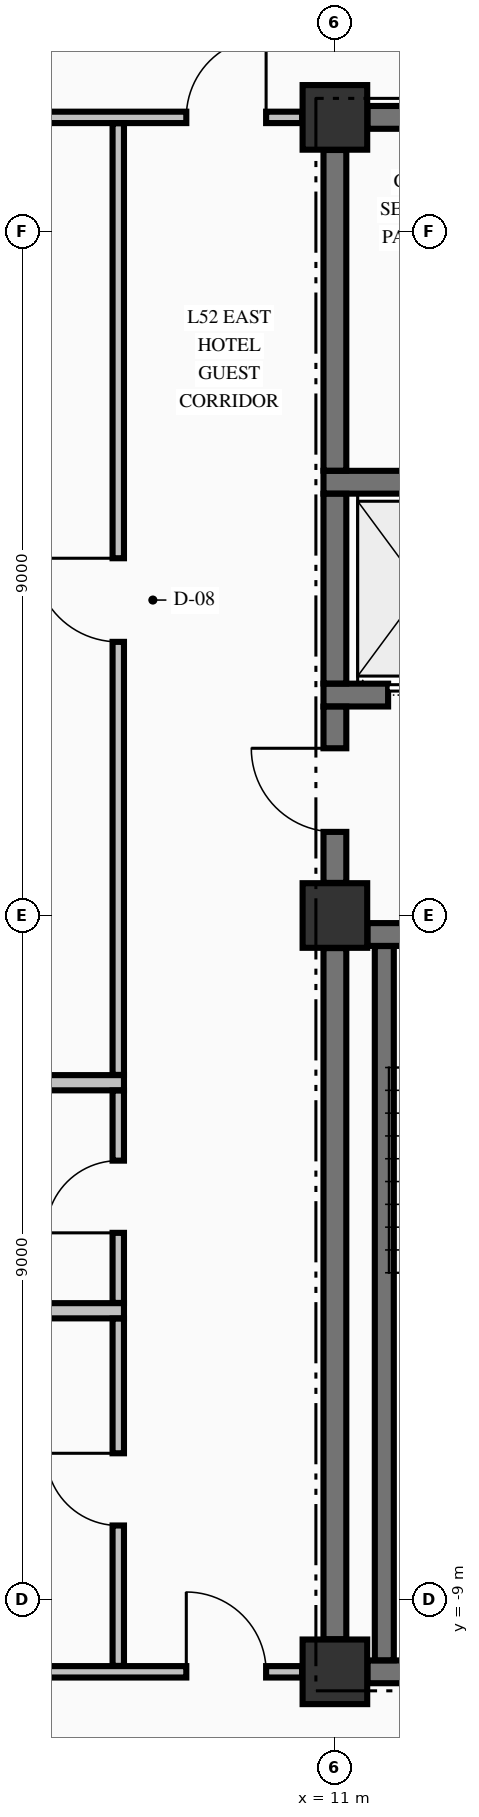
"""IFC4 building model, lengths in metres.
Left out: names, types, materials, properties, quantities, classifications, styles, units other than length and angle.
Written with IfcOpenShell. Run it as: python <this file> out.ifc"""

import sys

from ifc_helpers import new_model, si_unit, direction, frame, frame_2d, origin, origin_2d, place, context, subcontext, project, spatial, rectangle, extrude, element, fill, save


model = new_model("IFC4")
c1 = context("Model", 3, precision=1e-05, world=origin(), true_north=direction((0.0, 1.0)))
c2 = subcontext(c1, "Body", "Model", "MODEL_VIEW")
j1 = project(units=[si_unit("LENGTHUNIT", "METRE"), si_unit("PLANEANGLEUNIT", "RADIAN")], contexts=[c1])
p1 = place(None, origin())
s1 = spatial("IfcSite", under=j1, at=p1, CompositionType="ELEMENT")
p2 = place(p1, origin())
s2 = spatial("IfcBuilding", under=s1, at=p2, CompositionType="ELEMENT")
p3 = place(p2, frame((0.0, 0.0, 201.66)))
s3 = spatial("IfcBuildingStorey", under=s2, at=p3, CompositionType="ELEMENT", Elevation=201.66)
for number, where, z_axis, x_axis in (
    (1, (11.0, -9.95, -0.25), (0.0, 0.0, 1.0), (1.0, 0.0, 0.0)),
    (2, (11.0, 0.0, -0.25), (0.0, 0.0, 1.0), (1.0, 0.0, 0.0)),
    (3, (11.0, 10.5, -0.25), (0.0, 0.0, 1.0), (1.0, 0.0, 0.0)),
):
    element("IfcColumn", number, at=place(p3, frame(where, z_axis=z_axis, x_axis=x_axis)), inside=s3, PredefinedType="COLUMN", context=c2, shape_type="SweptSolid", body=[
        extrude(rectangle(XDim=0.85, YDim=0.85, at=origin_2d()), origin(), (0.0, 0.0, 1.0), 3.4),
    ])
p4 = place(p3, frame((11.429, -9.95, 0.0), z_axis=(0.0, 0.0, 1.0), x_axis=(1.0, 0.0, 0.0)))
e4 = element("IfcWall", 4, at=p4, inside=s3, PredefinedType="SHEAR", context=c2, shape_type="SweptSolid", body=[
    extrude(rectangle(XDim=3.271, YDim=0.3, at=frame_2d((1.635, 0.0))), origin(), (0.0, 0.0, 1.0), 3.15),
])
p5 = place(p3, frame((11.429, -0.25, 0.0), z_axis=(0.0, 0.0, 1.0), x_axis=(1.0, 0.0, 0.0)))
e5 = element("IfcWall", 5, at=p5, inside=s3, PredefinedType="SHEAR", context=c2, shape_type="SweptSolid", body=[
    extrude(rectangle(XDim=3.446, YDim=0.3, at=frame_2d((1.723, 0.0))), origin(), (0.0, 0.0, 1.0), 3.15),
])
p6 = place(p5, frame((1.171, 0.0, 0.0)))
e6 = element("IfcOpeningElement", 6, at=p6, cuts=e5, PredefinedType="OPENING", context=c2, shape_type="SweptSolid", body=[
    extrude(rectangle(XDim=1.1, YDim=2.15, at=frame_2d((0.55, 1.075))), frame((0.0, 0.16, 0.0), z_axis=(0.0, -1.0, 0.0), x_axis=(1.0, 0.0, 0.0)), (0.0, 0.0, 1.0), 0.32),
])
p7 = place(p3, frame((10.85, 2.9, 0.0), z_axis=(0.0, 0.0, 1.0), x_axis=(1.0, 0.0, 0.0)))
e7 = element("IfcWall", 7, at=p7, inside=s3, PredefinedType="SHEAR", context=c2, shape_type="SweptSolid", body=[
    extrude(rectangle(XDim=4.025, YDim=0.3, at=frame_2d((2.012, 0.0))), origin(), (0.0, 0.0, 1.0), 3.15),
])
p8 = place(p7, frame((0.85, 0.0, 0.0)))
e8 = element("IfcOpeningElement", 8, at=p8, cuts=e7, PredefinedType="OPENING", context=c2, shape_type="SweptSolid", body=[
    extrude(rectangle(XDim=1.1, YDim=2.2, at=frame_2d((0.55, 1.1))), frame((0.0, 0.16, 0.0), z_axis=(0.0, -1.0, 0.0), x_axis=(1.0, 0.0, 0.0)), (0.0, 0.0, 1.0), 0.32),
])
p9 = place(p3, frame((10.85, 5.7, 0.0), z_axis=(0.0, 0.0, 1.0), x_axis=(1.0, 0.0, 0.0)))
e9 = element("IfcWall", 9, at=p9, inside=s3, PredefinedType="SHEAR", context=c2, shape_type="SweptSolid", body=[
    extrude(rectangle(XDim=4.025, YDim=0.3, at=frame_2d((2.012, 0.0))), origin(), (0.0, 0.0, 1.0), 3.15),
])
p10 = place(p3, frame((11.429, 10.5, 0.0), z_axis=(0.0, 0.0, 1.0), x_axis=(1.0, 0.0, 0.0)))
e10 = element("IfcWall", 10, at=p10, inside=s3, PredefinedType="SHEAR", context=c2, shape_type="SweptSolid", body=[
    extrude(rectangle(XDim=3.271, YDim=0.3, at=frame_2d((1.635, 0.0))), origin(), (0.0, 0.0, 1.0), 3.15),
])
p11 = place(p10, frame((2.076, 0.0, 0.0)))
e11 = element("IfcOpeningElement", 11, at=p11, cuts=e10, PredefinedType="OPENING", context=c2, shape_type="SweptSolid", body=[
    extrude(rectangle(XDim=0.95, YDim=2.15, at=frame_2d((0.475, 1.075))), frame((0.0, 0.16, 0.0), z_axis=(0.0, -1.0, 0.0), x_axis=(1.0, 0.0, 0.0)), (0.0, 0.0, 1.0), 0.32),
])
p12 = place(p3, frame((-10.569, -9.95, 0.0), z_axis=(0.0, 0.0, 1.0), x_axis=(1.0, 0.0, 0.0)))
e12 = element("IfcWall", 12, at=p12, inside=s3, PredefinedType="PARTITIONING", context=c2, shape_type="SweptSolid", body=[
    extrude(rectangle(XDim=21.138, YDim=0.15, at=frame_2d((10.569, 0.0))), origin(), (0.0, 0.0, 1.0), 3.15),
])
p13 = place(p12, frame((0.474, 0.0, 0.0)))
e13 = element("IfcOpeningElement", 13, at=p13, cuts=e12, PredefinedType="OPENING", context=c2, shape_type="SweptSolid", body=[
    extrude(rectangle(XDim=1.05, YDim=2.15, at=frame_2d((0.525, 1.075))), frame((0.0, 0.085, 0.0), z_axis=(0.0, -1.0, 0.0), x_axis=(1.0, 0.0, 0.0)), (0.0, 0.0, 1.0), 0.17),
])
p14 = place(p12, frame((19.614, 0.0, 0.0)))
e14 = element("IfcOpeningElement", 14, at=p14, cuts=e12, PredefinedType="OPENING", context=c2, shape_type="SweptSolid", body=[
    extrude(rectangle(XDim=1.05, YDim=2.15, at=frame_2d((0.525, 1.075))), frame((0.0, 0.085, 0.0), z_axis=(0.0, -1.0, 0.0), x_axis=(1.0, 0.0, 0.0)), (0.0, 0.0, 1.0), 0.17),
])
p15 = place(p12, frame((13.574, 0.0, 0.0)))
e15 = element("IfcOpeningElement", 15, at=p15, cuts=e12, PredefinedType="OPENING", context=c2, shape_type="SweptSolid", body=[
    extrude(rectangle(XDim=0.95, YDim=2.15, at=frame_2d((0.475, 1.075))), frame((0.0, 0.085, 0.0), z_axis=(0.0, -1.0, 0.0), x_axis=(1.0, 0.0, 0.0)), (0.0, 0.0, 1.0), 0.17),
])
for number, where, z_axis, x_axis in (
    (16, (1.7, -5.2, 0.0), (0.0, 0.0, 1.0), (1.0, 0.0, 0.0)),
    (17, (1.7, -2.2, 0.0), (0.0, 0.0, 1.0), (1.0, 0.0, 0.0)),
):
    element("IfcWall", number, at=place(p3, frame(where, z_axis=z_axis, x_axis=x_axis)), inside=s3, PredefinedType="PARTITIONING", context=c2, shape_type="SweptSolid", body=[
        extrude(rectangle(XDim=6.525, YDim=0.2, at=frame_2d((3.263, 0.0))), origin(), (0.0, 0.0, 1.0), 3.15),
    ])
p16 = place(p3, frame((-10.569, 10.5, 0.0), z_axis=(0.0, 0.0, 1.0), x_axis=(1.0, 0.0, 0.0)))
e18 = element("IfcWall", 18, at=p16, inside=s3, PredefinedType="PARTITIONING", context=c2, shape_type="SweptSolid", body=[
    extrude(rectangle(XDim=21.138, YDim=0.15, at=frame_2d((10.569, 0.0))), origin(), (0.0, 0.0, 1.0), 3.15),
])
p17 = place(p16, frame((0.474, 0.0, 0.0)))
e19 = element("IfcOpeningElement", 19, at=p17, cuts=e18, PredefinedType="OPENING", context=c2, shape_type="SweptSolid", body=[
    extrude(rectangle(XDim=1.05, YDim=2.15, at=frame_2d((0.525, 1.075))), frame((0.0, 0.085, 0.0), z_axis=(0.0, -1.0, 0.0), x_axis=(1.0, 0.0, 0.0)), (0.0, 0.0, 1.0), 0.17),
])
p18 = place(p16, frame((19.614, 0.0, 0.0)))
e20 = element("IfcOpeningElement", 20, at=p18, cuts=e18, PredefinedType="OPENING", context=c2, shape_type="SweptSolid", body=[
    extrude(rectangle(XDim=1.05, YDim=2.15, at=frame_2d((0.525, 1.075))), frame((0.0, 0.085, 0.0), z_axis=(0.0, -1.0, 0.0), x_axis=(1.0, 0.0, 0.0)), (0.0, 0.0, 1.0), 0.17),
])
p19 = place(p3, frame((11.0, -9.521, 0.0), z_axis=(0.0, 0.0, 1.0), x_axis=(0.0, 1.0, 0.0)))
e21 = element("IfcWall", 21, at=p19, inside=s3, PredefinedType="SHEAR", context=c2, shape_type="SweptSolid", body=[
    extrude(rectangle(XDim=9.092, YDim=0.3, at=frame_2d((4.546, 0.0))), origin(), (0.0, 0.0, 1.0), 3.15),
])
p20 = place(p3, frame((11.0, 0.429, 0.0), z_axis=(0.0, 0.0, 1.0), x_axis=(0.0, 1.0, 0.0)))
e22 = element("IfcWall", 22, at=p20, inside=s3, PredefinedType="SHEAR", context=c2, shape_type="SweptSolid", body=[
    extrude(rectangle(XDim=2.319, YDim=0.3, at=frame_2d((1.16, 0.0))), origin(), (0.0, 0.0, 1.0), 3.15),
])
p21 = place(p20, frame((0.671, 0.0, 0.0)))
e23 = element("IfcOpeningElement", 23, at=p21, cuts=e22, PredefinedType="OPENING", context=c2, shape_type="SweptSolid", body=[
    extrude(rectangle(XDim=1.1, YDim=2.15, at=frame_2d((0.55, 1.075))), frame((0.0, 0.16, 0.0), z_axis=(0.0, -1.0, 0.0), x_axis=(1.0, 0.0, 0.0)), (0.0, 0.0, 1.0), 0.32),
])
p22 = place(p3, frame((11.0, 3.052, 0.0), z_axis=(0.0, 0.0, 1.0), x_axis=(0.0, 1.0, 0.0)))
e24 = element("IfcWall", 24, at=p22, inside=s3, PredefinedType="SHEAR", context=c2, shape_type="SweptSolid", body=[
    extrude(rectangle(XDim=2.496, YDim=0.3, at=frame_2d((1.248, 0.0))), origin(), (0.0, 0.0, 1.0), 3.15),
])
p23 = place(p3, frame((11.0, 5.852, 0.0), z_axis=(0.0, 0.0, 1.0), x_axis=(0.0, 1.0, 0.0)))
e25 = element("IfcWall", 25, at=p23, inside=s3, PredefinedType="SHEAR", context=c2, shape_type="SweptSolid", body=[
    extrude(rectangle(XDim=4.219, YDim=0.3, at=frame_2d((2.109, 0.0))), origin(), (0.0, 0.0, 1.0), 3.15),
])
p24 = place(p3, frame((11.65, -9.798, 0.0), z_axis=(0.0, 0.0, 1.0), x_axis=(0.0, 1.0, 0.0)))
e26 = element("IfcWall", 26, at=p24, inside=s3, PredefinedType="SOLIDWALL", context=c2, shape_type="SweptSolid", body=[
    extrude(rectangle(XDim=9.396, YDim=0.25, at=frame_2d((4.698, 0.0))), origin(), (0.0, 0.0, 1.0), 3.15),
])
p25 = place(p3, frame((8.15, -9.872, 0.0), z_axis=(0.0, 0.0, 1.0), x_axis=(0.0, 1.0, 0.0)))
e27 = element("IfcWall", 27, at=p25, inside=s3, PredefinedType="PARTITIONING", context=c2, shape_type="SweptSolid", body=[
    extrude(rectangle(XDim=4.569, YDim=0.15, at=frame_2d((2.285, 0.0))), origin(), (0.0, 0.0, 1.0), 3.15),
])
p26 = place(p25, frame((1.847, 0.0, 0.0)))
e28 = element("IfcOpeningElement", 28, at=p26, cuts=e27, PredefinedType="OPENING", context=c2, shape_type="SweptSolid", body=[
    extrude(rectangle(XDim=0.95, YDim=2.15, at=frame_2d((0.475, 1.075))), frame((0.0, 0.085, 0.0), z_axis=(0.0, -1.0, 0.0), x_axis=(1.0, 0.0, 0.0)), (0.0, 0.0, 1.0), 0.17),
])
p27 = place(p3, frame((8.15, -5.097, 0.0), z_axis=(0.0, 0.0, 1.0), x_axis=(0.0, 1.0, 0.0)))
e29 = element("IfcWall", 29, at=p27, inside=s3, PredefinedType="PARTITIONING", context=c2, shape_type="SweptSolid", body=[
    extrude(rectangle(XDim=2.794, YDim=0.15, at=frame_2d((1.397, 0.0))), origin(), (0.0, 0.0, 1.0), 3.15),
])
p28 = place(p27, frame((0.922, 0.0, 0.0)))
e30 = element("IfcOpeningElement", 30, at=p28, cuts=e29, PredefinedType="OPENING", context=c2, shape_type="SweptSolid", body=[
    extrude(rectangle(XDim=0.95, YDim=2.15, at=frame_2d((0.475, 1.075))), frame((0.0, 0.085, 0.0), z_axis=(0.0, -1.0, 0.0), x_axis=(1.0, 0.0, 0.0)), (0.0, 0.0, 1.0), 0.17),
])
p29 = place(p3, frame((8.15, -2.097, 0.0), z_axis=(0.0, 0.0, 1.0), x_axis=(0.0, 1.0, 0.0)))
e31 = element("IfcWall", 31, at=p29, inside=s3, PredefinedType="PARTITIONING", context=c2, shape_type="SweptSolid", body=[
    extrude(rectangle(XDim=12.519, YDim=0.15, at=frame_2d((6.26, 0.0))), origin(), (0.0, 0.0, 1.0), 3.15),
])
p30 = place(p29, frame((5.697, 0.0, 0.0)))
e32 = element("IfcOpeningElement", 32, at=p30, cuts=e31, PredefinedType="OPENING", context=c2, shape_type="SweptSolid", body=[
    extrude(rectangle(XDim=1.1, YDim=2.15, at=frame_2d((0.55, 1.075))), frame((0.0, 0.085, 0.0), z_axis=(0.0, -1.0, 0.0), x_axis=(1.0, 0.0, 0.0)), (0.0, 0.0, 1.0), 0.17),
])
p31 = place(p21, origin())
e33 = element("IfcDoor", 33, at=p31, inside=s3, OperationType="SINGLE_SWING_RIGHT", PredefinedType="DOOR", context=c2, shape_type="SweptSolid", body=[
    extrude(rectangle(XDim=1.1, YDim=2.15, at=frame_2d((0.55, 1.075))), frame((0.0, 0.025, 0.0), z_axis=(0.0, -1.0, 0.0), x_axis=(1.0, 0.0, 0.0)), (0.0, 0.0, 1.0), 0.05),
])
fill(e23, e33)
p32 = place(p8, origin())
e34 = element("IfcDoor", 34, at=p32, inside=s3, OperationType="SLIDING_TO_RIGHT", PredefinedType="DOOR", context=c2, shape_type="SweptSolid", body=[
    extrude(rectangle(XDim=1.1, YDim=2.2, at=frame_2d((0.55, 1.1))), frame((0.0, 0.025, 0.0), z_axis=(0.0, -1.0, 0.0), x_axis=(1.0, 0.0, 0.0)), (0.0, 0.0, 1.0), 0.05),
])
fill(e8, e34)
p33 = place(p18, origin())
e35 = element("IfcDoor", 35, at=p33, inside=s3, OperationType="SINGLE_SWING_RIGHT", PredefinedType="DOOR", context=c2, shape_type="SweptSolid", body=[
    extrude(rectangle(XDim=1.05, YDim=2.15, at=frame_2d((0.525, 1.075))), frame((0.0, 0.025, 0.0), z_axis=(0.0, -1.0, 0.0), x_axis=(1.0, 0.0, 0.0)), (0.0, 0.0, 1.0), 0.05),
])
fill(e20, e35)
p34 = place(p14, origin())
e36 = element("IfcDoor", 36, at=p34, inside=s3, OperationType="SINGLE_SWING_LEFT", PredefinedType="DOOR", context=c2, shape_type="SweptSolid", body=[
    extrude(rectangle(XDim=1.05, YDim=2.15, at=frame_2d((0.525, 1.075))), frame((0.0, 0.025, 0.0), z_axis=(0.0, -1.0, 0.0), x_axis=(1.0, 0.0, 0.0)), (0.0, 0.0, 1.0), 0.05),
])
fill(e14, e36)
p35 = place(p30, origin())
e37 = element("IfcDoor", 37, at=p35, inside=s3, OperationType="SINGLE_SWING_RIGHT", PredefinedType="DOOR", context=c2, shape_type="SweptSolid", body=[
    extrude(rectangle(XDim=1.1, YDim=2.15, at=frame_2d((0.55, 1.075))), frame((0.0, 0.025, 0.0), z_axis=(0.0, -1.0, 0.0), x_axis=(1.0, 0.0, 0.0)), (0.0, 0.0, 1.0), 0.05),
])
fill(e32, e37)
p36 = place(p28, origin())
e38 = element("IfcDoor", 38, at=p36, inside=s3, OperationType="SINGLE_SWING_LEFT", PredefinedType="DOOR", context=c2, shape_type="SweptSolid", body=[
    extrude(rectangle(XDim=0.95, YDim=2.15, at=frame_2d((0.475, 1.075))), frame((0.0, 0.025, 0.0), z_axis=(0.0, -1.0, 0.0), x_axis=(1.0, 0.0, 0.0)), (0.0, 0.0, 1.0), 0.05),
])
fill(e30, e38)
p37 = place(p26, origin())
e39 = element("IfcDoor", 39, at=p37, inside=s3, OperationType="SINGLE_SWING_RIGHT", PredefinedType="DOOR", context=c2, shape_type="SweptSolid", body=[
    extrude(rectangle(XDim=0.95, YDim=2.15, at=frame_2d((0.475, 1.075))), frame((0.0, 0.025, 0.0), z_axis=(0.0, -1.0, 0.0), x_axis=(1.0, 0.0, 0.0)), (0.0, 0.0, 1.0), 0.05),
])
fill(e28, e39)
save(model, sys.argv[1])
